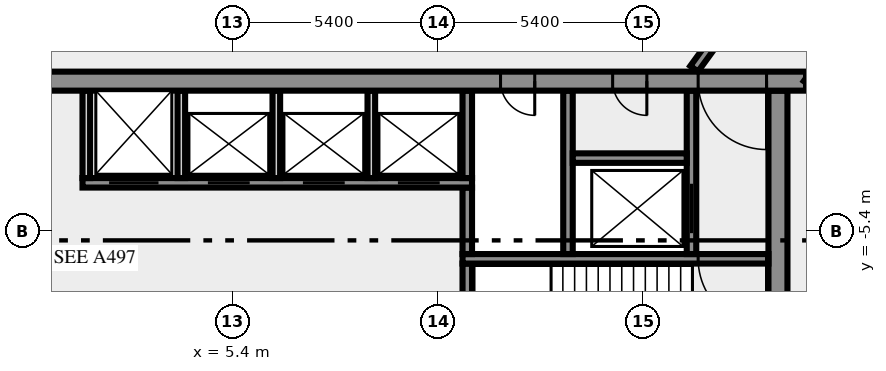
"""IFC4 building model, lengths in metres.
Left out: names, types, materials, properties, quantities, classifications, styles, units other than length and angle.
Written with IfcOpenShell. Run it as: python <this file> out.ifc"""

import sys

from ifc_helpers import new_model, si_unit, direction, frame, frame_2d, origin, place, context, subcontext, project, spatial, rectangle, extrude, element, fill, save


model = new_model("IFC4")
c1 = context("Model", 3, precision=1e-05, world=origin(), true_north=direction((0.0, 1.0)))
c2 = subcontext(c1, "Body", "Model", "MODEL_VIEW")
j1 = project(units=[si_unit("LENGTHUNIT", "METRE"), si_unit("PLANEANGLEUNIT", "RADIAN")], contexts=[c1])
p1 = place(None, origin())
s1 = spatial("IfcSite", under=j1, at=p1, CompositionType="ELEMENT")
p2 = place(p1, origin())
s2 = spatial("IfcBuilding", under=s1, at=p2, CompositionType="ELEMENT")
p3 = place(p2, frame((0.0, 0.0, 222.0)))
s3 = spatial("IfcBuildingStorey", under=s2, at=p3, CompositionType="ELEMENT", Elevation=222.0)
p4 = place(p3, frame((19.75, -10.5, 0.0), z_axis=(0.0, 0.0, 1.0), x_axis=(0.0, 1.0, 0.0)))
e1 = element("IfcWall", 1, at=p4, inside=s3, PredefinedType="SHEAR", context=c2, shape_type="SweptSolid", body=[
    extrude(rectangle(XDim=8.8, YDim=0.5, at=frame_2d((4.4, 0.0))), origin(), (0.0, 0.0, 1.0), 3.65),
])
p5 = place(p3, frame((11.575, -7.25, 0.0), z_axis=(0.0, 0.0, 1.0), x_axis=(0.0, 1.0, 0.0)))
e2 = element("IfcWall", 2, at=p5, inside=s3, PredefinedType="SHEAR", context=c2, shape_type="SweptSolid", body=[
    extrude(rectangle(XDim=1.0, YDim=0.25, at=frame_2d((0.5, 0.0))), origin(), (0.0, 0.0, 1.0), 3.65),
])
p6 = place(p3, frame((19.5, -6.125, 0.0), z_axis=(0.0, 0.0, 1.0), x_axis=(-1.0, 0.0, 0.0)))
e3 = element("IfcWall", 3, at=p6, inside=s3, PredefinedType="SHEAR", context=c2, shape_type="SweptSolid", body=[
    extrude(rectangle(XDim=8.05, YDim=0.25, at=frame_2d((4.025, 0.0))), origin(), (0.0, 0.0, 1.0), 3.65),
])
p7 = place(p6, frame((0.05, 0.0, 0.0)))
e4 = element("IfcOpeningElement", 4, at=p7, cuts=e3, PredefinedType="OPENING", context=c2, shape_type="SweptSolid", body=[
    extrude(rectangle(XDim=1.8, YDim=2.1, at=frame_2d((0.9, 1.05))), frame((0.0, 0.135, 0.0), z_axis=(0.0, -1.0, 0.0), x_axis=(1.0, 0.0, 0.0)), (0.0, 0.0, 1.0), 0.27),
])
p8 = place(p3, frame((11.575, -6.0, 0.0), z_axis=(0.0, 0.0, 1.0), x_axis=(0.0, 1.0, 0.0)))
e5 = element("IfcWall", 5, at=p8, inside=s3, PredefinedType="SHEAR", context=c2, shape_type="SweptSolid", body=[
    extrude(rectangle(XDim=1.75, YDim=0.25, at=frame_2d((0.875, 0.0))), origin(), (0.0, 0.0, 1.0), 3.65),
])
p9 = place(p3, frame((14.225, -6.0, 0.0), z_axis=(0.0, 0.0, 1.0), x_axis=(0.0, 1.0, 0.0)))
e6 = element("IfcWall", 6, at=p9, inside=s3, PredefinedType="SHEAR", context=c2, shape_type="SweptSolid", body=[
    extrude(rectangle(XDim=4.3, YDim=0.25, at=frame_2d((2.15, 0.0))), origin(), (0.0, 0.0, 1.0), 3.65),
])
p10 = place(p3, frame((17.475, -6.0, 0.0), z_axis=(0.0, 0.0, 1.0), x_axis=(0.0, 1.0, 0.0)))
e7 = element("IfcWall", 7, at=p10, inside=s3, PredefinedType="SHEAR", context=c2, shape_type="SweptSolid", body=[
    extrude(rectangle(XDim=4.3, YDim=0.25, at=frame_2d((2.15, 0.0))), origin(), (0.0, 0.0, 1.0), 3.65),
])
p11 = place(p10, frame((0.55, 0.0, 0.0)))
e8 = element("IfcOpeningElement", 8, at=p11, cuts=e7, PredefinedType="OPENING", context=c2, shape_type="SweptSolid", body=[
    extrude(rectangle(XDim=1.3, YDim=2.1, at=frame_2d((0.65, 1.05))), frame((0.0, 0.135, 0.0), z_axis=(0.0, -1.0, 0.0), x_axis=(1.0, 0.0, 0.0)), (0.0, 0.0, 1.0), 0.27),
])
p12 = place(p3, frame((1.45, -4.125, 0.0), z_axis=(0.0, 0.0, 1.0), x_axis=(1.0, 0.0, 0.0)))
e9 = element("IfcWall", 9, at=p12, inside=s3, PredefinedType="SHEAR", context=c2, shape_type="SweptSolid", body=[
    extrude(rectangle(XDim=10.25, YDim=0.25, at=frame_2d((5.125, 0.0))), origin(), (0.0, 0.0, 1.0), 3.65),
])
p13 = place(p12, frame((0.7, 0.0, 0.0)))
e10 = element("IfcOpeningElement", 10, at=p13, cuts=e9, PredefinedType="OPENING", context=c2, shape_type="SweptSolid", body=[
    extrude(rectangle(XDim=1.3, YDim=2.1, at=frame_2d((0.65, 1.05))), frame((0.0, 0.135, 0.0), z_axis=(0.0, -1.0, 0.0), x_axis=(1.0, 0.0, 0.0)), (0.0, 0.0, 1.0), 0.27),
])
p14 = place(p12, frame((3.3, 0.0, 0.0)))
e11 = element("IfcOpeningElement", 11, at=p14, cuts=e9, PredefinedType="OPENING", context=c2, shape_type="SweptSolid", body=[
    extrude(rectangle(XDim=1.1, YDim=2.1, at=frame_2d((0.55, 1.05))), frame((0.0, 0.135, 0.0), z_axis=(0.0, -1.0, 0.0), x_axis=(1.0, 0.0, 0.0)), (0.0, 0.0, 1.0), 0.27),
])
p15 = place(p12, frame((5.8, 0.0, 0.0)))
e12 = element("IfcOpeningElement", 12, at=p15, cuts=e9, PredefinedType="OPENING", context=c2, shape_type="SweptSolid", body=[
    extrude(rectangle(XDim=1.1, YDim=2.1, at=frame_2d((0.55, 1.05))), frame((0.0, 0.135, 0.0), z_axis=(0.0, -1.0, 0.0), x_axis=(1.0, 0.0, 0.0)), (0.0, 0.0, 1.0), 0.27),
])
p16 = place(p12, frame((8.3, 0.0, 0.0)))
e13 = element("IfcOpeningElement", 13, at=p16, cuts=e9, PredefinedType="OPENING", context=c2, shape_type="SweptSolid", body=[
    extrude(rectangle(XDim=1.1, YDim=2.1, at=frame_2d((0.55, 1.05))), frame((0.0, 0.135, 0.0), z_axis=(0.0, -1.0, 0.0), x_axis=(1.0, 0.0, 0.0)), (0.0, 0.0, 1.0), 0.27),
])
for number, where, z_axis, x_axis in (
    (14, (1.55, -4.0, 0.0), (0.0, 0.0, 1.0), (0.0, 1.0, 0.0)),
    (15, (4.05, -4.0, 0.0), (0.0, 0.0, 1.0), (0.0, 1.0, 0.0)),
    (16, (6.55, -4.0, 0.0), (0.0, 0.0, 1.0), (0.0, 1.0, 0.0)),
    (17, (9.05, -4.0, 0.0), (0.0, 0.0, 1.0), (0.0, 1.0, 0.0)),
):
    element("IfcWall", number, at=place(p3, frame(where, z_axis=z_axis, x_axis=x_axis)), inside=s3, PredefinedType="SOLIDWALL", context=c2, shape_type="SweptSolid", body=[
        extrude(rectangle(XDim=2.3, YDim=0.2, at=frame_2d((1.15, 0.0))), origin(), (0.0, 0.0, 1.0), 3.65),
    ])
p17 = place(p3, frame((11.575, -4.0, 0.0), z_axis=(0.0, 0.0, 1.0), x_axis=(0.0, 1.0, 0.0)))
e18 = element("IfcWall", 18, at=p17, inside=s3, PredefinedType="SHEAR", context=c2, shape_type="SweptSolid", body=[
    extrude(rectangle(XDim=2.3, YDim=0.25, at=frame_2d((1.15, 0.0))), origin(), (0.0, 0.0, 1.0), 3.65),
])
p18 = place(p3, frame((14.35, -3.475, 0.0), z_axis=(0.0, 0.0, 1.0), x_axis=(1.0, 0.0, 0.0)))
e19 = element("IfcWall", 19, at=p18, inside=s3, PredefinedType="SHEAR", context=c2, shape_type="SweptSolid", body=[
    extrude(rectangle(XDim=3.0, YDim=0.25, at=frame_2d((1.5, 0.0))), origin(), (0.0, 0.0, 1.0), 3.65),
])
p19 = place(p3, frame((20.49, -1.45, 0.0), z_axis=(0.0, 0.0, 1.0), x_axis=(-1.0, 0.0, 0.0)))
e20 = element("IfcWall", 20, at=p19, inside=s3, PredefinedType="SHEAR", context=c2, shape_type="SweptSolid", body=[
    extrude(rectangle(XDim=40.98, YDim=0.5, at=frame_2d((20.49, 0.0))), origin(), (0.0, 0.0, 1.0), 3.65),
])
p20 = place(p19, frame((38.14, 0.0, 0.0)))
e21 = element("IfcOpeningElement", 21, at=p20, cuts=e20, PredefinedType="OPENING", context=c2, shape_type="SweptSolid", body=[
    extrude(rectangle(XDim=1.8, YDim=2.1, at=frame_2d((0.9, 1.05))), frame((0.0, 0.26, 0.0), z_axis=(0.0, -1.0, 0.0), x_axis=(1.0, 0.0, 0.0)), (0.0, 0.0, 1.0), 0.52),
])
p21 = place(p19, frame((36.728, 0.0, 0.0)))
e22 = element("IfcOpeningElement", 22, at=p21, cuts=e20, PredefinedType="OPENING", context=c2, shape_type="SweptSolid", body=[
    extrude(rectangle(XDim=0.8, YDim=2.1, at=frame_2d((0.4, 1.05))), frame((0.0, 0.26, 0.0), z_axis=(0.0, -1.0, 0.0), x_axis=(1.0, 0.0, 0.0)), (0.0, 0.0, 1.0), 0.52),
])
p22 = place(p19, frame((35.153, 0.0, 0.0)))
e23 = element("IfcOpeningElement", 23, at=p22, cuts=e20, PredefinedType="OPENING", context=c2, shape_type="SweptSolid", body=[
    extrude(rectangle(XDim=0.8, YDim=2.1, at=frame_2d((0.4, 1.05))), frame((0.0, 0.26, 0.0), z_axis=(0.0, -1.0, 0.0), x_axis=(1.0, 0.0, 0.0)), (0.0, 0.0, 1.0), 0.52),
])
p23 = place(p19, frame((32.94, 0.0, 0.0)))
e24 = element("IfcOpeningElement", 24, at=p23, cuts=e20, PredefinedType="OPENING", context=c2, shape_type="SweptSolid", body=[
    extrude(rectangle(XDim=0.9, YDim=2.1, at=frame_2d((0.45, 1.05))), frame((0.0, 0.26, 0.0), z_axis=(0.0, -1.0, 0.0), x_axis=(1.0, 0.0, 0.0)), (0.0, 0.0, 1.0), 0.52),
])
p24 = place(p19, frame((30.202, 0.0, 0.0)))
e25 = element("IfcOpeningElement", 25, at=p24, cuts=e20, PredefinedType="OPENING", context=c2, shape_type="SweptSolid", body=[
    extrude(rectangle(XDim=0.9, YDim=2.1, at=frame_2d((0.45, 1.05))), frame((0.0, 0.26, 0.0), z_axis=(0.0, -1.0, 0.0), x_axis=(1.0, 0.0, 0.0)), (0.0, 0.0, 1.0), 0.52),
])
p25 = place(p19, frame((27.74, 0.0, 0.0)))
e26 = element("IfcOpeningElement", 26, at=p25, cuts=e20, PredefinedType="OPENING", context=c2, shape_type="SweptSolid", body=[
    extrude(rectangle(XDim=0.9, YDim=2.1, at=frame_2d((0.45, 1.05))), frame((0.0, 0.26, 0.0), z_axis=(0.0, -1.0, 0.0), x_axis=(1.0, 0.0, 0.0)), (0.0, 0.0, 1.0), 0.52),
])
p26 = place(p19, frame((25.377, 0.0, 0.0)))
e27 = element("IfcOpeningElement", 27, at=p26, cuts=e20, PredefinedType="OPENING", context=c2, shape_type="SweptSolid", body=[
    extrude(rectangle(XDim=0.9, YDim=2.1, at=frame_2d((0.45, 1.05))), frame((0.0, 0.26, 0.0), z_axis=(0.0, -1.0, 0.0), x_axis=(1.0, 0.0, 0.0)), (0.0, 0.0, 1.0), 0.52),
])
p27 = place(p19, frame((20.74, 0.0, 0.0)))
e28 = element("IfcOpeningElement", 28, at=p27, cuts=e20, PredefinedType="OPENING", context=c2, shape_type="SweptSolid", body=[
    extrude(rectangle(XDim=2.0, YDim=2.1, at=frame_2d((1.0, 1.05))), frame((0.0, 0.26, 0.0), z_axis=(0.0, -1.0, 0.0), x_axis=(1.0, 0.0, 0.0)), (0.0, 0.0, 1.0), 0.52),
])
p28 = place(p19, frame((7.14, 0.0, 0.0)))
e29 = element("IfcOpeningElement", 29, at=p28, cuts=e20, PredefinedType="OPENING", context=c2, shape_type="SweptSolid", body=[
    extrude(rectangle(XDim=0.9, YDim=2.1, at=frame_2d((0.45, 1.05))), frame((0.0, 0.26, 0.0), z_axis=(0.0, -1.0, 0.0), x_axis=(1.0, 0.0, 0.0)), (0.0, 0.0, 1.0), 0.52),
])
p29 = place(p19, frame((4.19, 0.0, 0.0)))
e30 = element("IfcOpeningElement", 30, at=p29, cuts=e20, PredefinedType="OPENING", context=c2, shape_type="SweptSolid", body=[
    extrude(rectangle(XDim=0.9, YDim=2.1, at=frame_2d((0.45, 1.05))), frame((0.0, 0.26, 0.0), z_axis=(0.0, -1.0, 0.0), x_axis=(1.0, 0.0, 0.0)), (0.0, 0.0, 1.0), 0.52),
])
p30 = place(p19, frame((1.04, 0.0, 0.0)))
e31 = element("IfcOpeningElement", 31, at=p30, cuts=e20, PredefinedType="OPENING", context=c2, shape_type="SweptSolid", body=[
    extrude(rectangle(XDim=1.8, YDim=2.1, at=frame_2d((0.9, 1.05))), frame((0.0, 0.26, 0.0), z_axis=(0.0, -1.0, 0.0), x_axis=(1.0, 0.0, 0.0)), (0.0, 0.0, 1.0), 0.52),
])
p31 = place(p3, frame((17.545, -1.125, 0.0), z_axis=(0.0, 0.0, 1.0), x_axis=(0.587787966774, 0.809015022181, 0.0)))
e32 = element("IfcWall", 32, at=p31, inside=s3, PredefinedType="SOLIDWALL", context=c2, shape_type="SweptSolid", body=[
    extrude(rectangle(XDim=23.345, YDim=0.25, at=frame_2d((11.672, 0.0))), origin(), (0.0, 0.0, 1.0), 3.65),
])
p32 = place(p31, frame((3.441, 0.0, 0.0)))
e33 = element("IfcOpeningElement", 33, at=p32, cuts=e32, PredefinedType="OPENING", context=c2, shape_type="SweptSolid", body=[
    extrude(rectangle(XDim=0.9, YDim=2.1, at=frame_2d((0.45, 1.05))), frame((0.0, 0.135, 0.0), z_axis=(0.0, -1.0, 0.0), x_axis=(1.0, 0.0, 0.0)), (0.0, 0.0, 1.0), 0.27),
])
p33 = place(p3, frame((33.41, 16.203, 0.0), z_axis=(0.0, 0.0, 1.0), x_axis=(-0.587786711753, -0.809015934013, 0.0)))
e34 = element("IfcWall", 34, at=p33, inside=s3, PredefinedType="SOLIDWALL", context=c2, shape_type="SweptSolid", body=[
    extrude(rectangle(XDim=21.911, YDim=0.25, at=frame_2d((10.956, 0.0))), origin(), (0.0, 0.0, 1.0), 3.65),
])
p34 = place(p33, frame((20.479, 0.0, 0.0)))
e35 = element("IfcOpeningElement", 35, at=p34, cuts=e34, PredefinedType="OPENING", context=c2, shape_type="SweptSolid", body=[
    extrude(rectangle(XDim=0.9, YDim=2.1, at=frame_2d((0.45, 1.05))), frame((0.0, 0.135, 0.0), z_axis=(0.0, -1.0, 0.0), x_axis=(1.0, 0.0, 0.0)), (0.0, 0.0, 1.0), 0.27),
])
p35 = place(p7, origin())
e36 = element("IfcDoor", 36, at=p35, inside=s3, OperationType="DOUBLE_DOOR_SINGLE_SWING", PredefinedType="DOOR", context=c2, shape_type="SweptSolid", body=[
    extrude(rectangle(XDim=1.8, YDim=2.1, at=frame_2d((0.9, 1.05))), frame((0.0, 0.025, 0.0), z_axis=(0.0, -1.0, 0.0), x_axis=(1.0, 0.0, 0.0)), (0.0, 0.0, 1.0), 0.05),
])
fill(e4, e36)
p36 = place(p11, origin())
e37 = element("IfcDoor", 37, at=p36, inside=s3, OperationType="DOUBLE_DOOR_SLIDING", PredefinedType="DOOR", context=c2, shape_type="SweptSolid", body=[
    extrude(rectangle(XDim=1.3, YDim=2.1, at=frame_2d((0.65, 1.05))), frame((0.0, 0.025, 0.0), z_axis=(0.0, -1.0, 0.0), x_axis=(1.0, 0.0, 0.0)), (0.0, 0.0, 1.0), 0.05),
])
fill(e8, e37)
p37 = place(p13, origin())
e38 = element("IfcDoor", 38, at=p37, inside=s3, OperationType="DOUBLE_DOOR_SLIDING", PredefinedType="DOOR", context=c2, shape_type="SweptSolid", body=[
    extrude(rectangle(XDim=1.3, YDim=2.1, at=frame_2d((0.65, 1.05))), frame((0.0, 0.025, 0.0), z_axis=(0.0, -1.0, 0.0), x_axis=(1.0, 0.0, 0.0)), (0.0, 0.0, 1.0), 0.05),
])
fill(e10, e38)
p38 = place(p14, origin())
e39 = element("IfcDoor", 39, at=p38, inside=s3, OperationType="DOUBLE_DOOR_SLIDING", PredefinedType="DOOR", context=c2, shape_type="SweptSolid", body=[
    extrude(rectangle(XDim=1.1, YDim=2.1, at=frame_2d((0.55, 1.05))), frame((0.0, 0.025, 0.0), z_axis=(0.0, -1.0, 0.0), x_axis=(1.0, 0.0, 0.0)), (0.0, 0.0, 1.0), 0.05),
])
fill(e11, e39)
p39 = place(p15, origin())
e40 = element("IfcDoor", 40, at=p39, inside=s3, OperationType="DOUBLE_DOOR_SLIDING", PredefinedType="DOOR", context=c2, shape_type="SweptSolid", body=[
    extrude(rectangle(XDim=1.1, YDim=2.1, at=frame_2d((0.55, 1.05))), frame((0.0, 0.025, 0.0), z_axis=(0.0, -1.0, 0.0), x_axis=(1.0, 0.0, 0.0)), (0.0, 0.0, 1.0), 0.05),
])
fill(e12, e40)
p40 = place(p16, origin())
e41 = element("IfcDoor", 41, at=p40, inside=s3, OperationType="DOUBLE_DOOR_SLIDING", PredefinedType="DOOR", context=c2, shape_type="SweptSolid", body=[
    extrude(rectangle(XDim=1.1, YDim=2.1, at=frame_2d((0.55, 1.05))), frame((0.0, 0.025, 0.0), z_axis=(0.0, -1.0, 0.0), x_axis=(1.0, 0.0, 0.0)), (0.0, 0.0, 1.0), 0.05),
])
fill(e13, e41)
p41 = place(p28, origin())
e42 = element("IfcDoor", 42, at=p41, inside=s3, OperationType="SINGLE_SWING_LEFT", PredefinedType="DOOR", context=c2, shape_type="SweptSolid", body=[
    extrude(rectangle(XDim=0.9, YDim=2.1, at=frame_2d((0.45, 1.05))), frame((0.0, 0.025, 0.0), z_axis=(0.0, -1.0, 0.0), x_axis=(1.0, 0.0, 0.0)), (0.0, 0.0, 1.0), 0.05),
])
fill(e29, e42)
p42 = place(p29, origin())
e43 = element("IfcDoor", 43, at=p42, inside=s3, OperationType="SINGLE_SWING_LEFT", PredefinedType="DOOR", context=c2, shape_type="SweptSolid", body=[
    extrude(rectangle(XDim=0.9, YDim=2.1, at=frame_2d((0.45, 1.05))), frame((0.0, 0.025, 0.0), z_axis=(0.0, -1.0, 0.0), x_axis=(1.0, 0.0, 0.0)), (0.0, 0.0, 1.0), 0.05),
])
fill(e30, e43)
p43 = place(p30, origin())
e44 = element("IfcDoor", 44, at=p43, inside=s3, OperationType="DOUBLE_DOOR_SINGLE_SWING", PredefinedType="DOOR", context=c2, shape_type="SweptSolid", body=[
    extrude(rectangle(XDim=1.8, YDim=2.1, at=frame_2d((0.9, 1.05))), frame((0.0, 0.025, 0.0), z_axis=(0.0, -1.0, 0.0), x_axis=(1.0, 0.0, 0.0)), (0.0, 0.0, 1.0), 0.05),
])
fill(e31, e44)
save(model, sys.argv[1])
